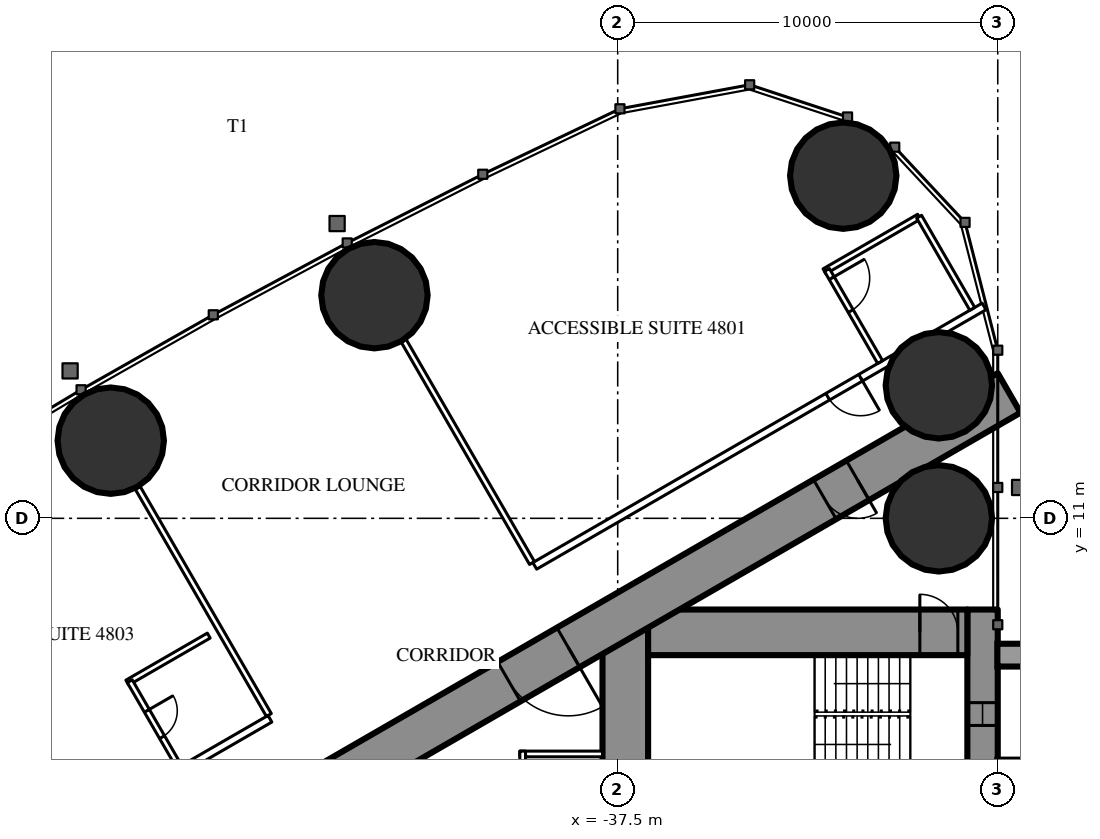
"""IFC4 building model, lengths in metres.
Left out: names, types, materials, properties, quantities, classifications, styles, units other than length and angle.
Written with IfcOpenShell. Run it as: python <this file> out.ifc"""

import sys

from ifc_helpers import new_model, si_unit, direction, frame, frame_2d, origin, origin_2d, place, context, subcontext, project, spatial, rectangle, circle, extrude, element, fill, save


model = new_model("IFC4")
c1 = context("Model", 3, precision=1e-05, world=origin(), true_north=direction((0.0, 1.0)))
c2 = subcontext(c1, "Body", "Model", "MODEL_VIEW")
j1 = project(units=[si_unit("LENGTHUNIT", "METRE"), si_unit("PLANEANGLEUNIT", "RADIAN")], contexts=[c1])
p1 = place(None, origin())
s1 = spatial("IfcSite", under=j1, at=p1, CompositionType="ELEMENT")
p2 = place(p1, origin())
s2 = spatial("IfcBuilding", under=s1, at=p2, CompositionType="ELEMENT")
p3 = place(p2, frame((0.0, 0.0, 180.8)))
s3 = spatial("IfcBuildingStorey", under=s2, at=p3, CompositionType="ELEMENT", Elevation=180.8)
for number, where, z_axis, x_axis in (
    (1, (-31.565, 20.016, 0.0), (0.0, 0.0, 1.0), (1.0, 0.0, 0.0)),
    (2, (-29.05, 11.0, 0.0), (0.0, 0.0, 1.0), (1.0, 0.0, 0.0)),
    (3, (-29.05, 14.5, 0.0), (0.0, 0.0, 1.0), (1.0, 0.0, 0.0)),
    (4, (-43.9, 16.871, 0.0), (0.0, 0.0, 1.0), (1.0, 0.0, 0.0)),
    (5, (-50.839, 13.043, 0.0), (0.0, 0.0, 1.0), (1.0, 0.0, 0.0)),
):
    element("IfcColumn", number, at=place(p3, frame(where, z_axis=z_axis, x_axis=x_axis)), inside=s3, PredefinedType="COLUMN", context=c2, shape_type="SweptSolid", body=[
        extrude(circle(Radius=1.4, at=origin_2d()), origin(), (0.0, 0.0, 1.0), 3.5),
    ])
p4 = place(p3, frame((-27.9, 8.6, 0.0), z_axis=(0.0, 0.0, 1.0), x_axis=(0.0, -1.0, 0.0)))
e6 = element("IfcWall", 6, at=p4, inside=s3, PredefinedType="SHEAR", context=c2, shape_type="SweptSolid", body=[
    extrude(rectangle(XDim=17.2, YDim=0.8, at=frame_2d((8.6, 0.0))), origin(), (0.0, 0.0, 1.0), 3.5),
])
p5 = place(p4, frame((2.45, 0.0, 0.6)))
e7 = element("IfcOpeningElement", 7, at=p5, cuts=e6, PredefinedType="OPENING", context=c2, shape_type="SweptSolid", body=[
    extrude(rectangle(XDim=0.6, YDim=2.1, at=frame_2d((0.3, 1.05))), frame((0.0, 0.41, 0.0), z_axis=(0.0, -1.0, 0.0), x_axis=(1.0, 0.0, 0.0)), (0.0, 0.0, 1.0), 0.82),
])
p6 = place(p4, frame((14.15, 0.0, 0.6)))
e8 = element("IfcOpeningElement", 8, at=p6, cuts=e6, PredefinedType="OPENING", context=c2, shape_type="SweptSolid", body=[
    extrude(rectangle(XDim=0.6, YDim=2.1, at=frame_2d((0.3, 1.05))), frame((0.0, 0.41, 0.0), z_axis=(0.0, -1.0, 0.0), x_axis=(1.0, 0.0, 0.0)), (0.0, 0.0, 1.0), 0.82),
])
p7 = place(p3, frame((-37.3, 8.6, 0.0), z_axis=(0.0, 0.0, 1.0), x_axis=(0.0, -1.0, 0.0)))
e9 = element("IfcWall", 9, at=p7, inside=s3, PredefinedType="SHEAR", context=c2, shape_type="SweptSolid", body=[
    extrude(rectangle(XDim=17.2, YDim=1.2, at=frame_2d((8.6, 0.0))), origin(), (0.0, 0.0, 1.0), 3.5),
])
p8 = place(p7, frame((7.7, 0.0, 0.0)))
e10 = element("IfcOpeningElement", 10, at=p8, cuts=e9, PredefinedType="OPENING", context=c2, shape_type="SweptSolid", body=[
    extrude(rectangle(XDim=1.8, YDim=2.2, at=frame_2d((0.9, 1.1))), frame((0.0, 0.61, 0.0), z_axis=(0.0, -1.0, 0.0), x_axis=(1.0, 0.0, 0.0)), (0.0, 0.0, 1.0), 1.22),
])
p9 = place(p3, frame((-28.3, 8.0, 0.0), z_axis=(0.0, 0.0, 1.0), x_axis=(-1.0, 0.0, 0.0)))
e11 = element("IfcWall", 11, at=p9, inside=s3, PredefinedType="SHEAR", context=c2, shape_type="SweptSolid", body=[
    extrude(rectangle(XDim=8.4, YDim=1.2, at=frame_2d((4.2, 0.0))), origin(), (0.0, 0.0, 1.0), 3.5),
])
p10 = place(p9, frame((0.25, 0.0, 0.0)))
e12 = element("IfcOpeningElement", 12, at=p10, cuts=e11, PredefinedType="OPENING", context=c2, shape_type="SweptSolid", body=[
    extrude(rectangle(XDim=1.0, YDim=2.2, at=frame_2d((0.5, 1.1))), frame((0.0, 0.61, 0.0), z_axis=(0.0, -1.0, 0.0), x_axis=(1.0, 0.0, 0.0)), (0.0, 0.0, 1.0), 1.22),
])
p11 = place(p3, frame((-27.2, 14.3, 0.0), z_axis=(0.0, 0.0, 1.0), x_axis=(-0.866026593062, -0.499997940104, 0.0)))
e13 = element("IfcWall", 13, at=p11, inside=s3, PredefinedType="SHEAR", context=c2, shape_type="SweptSolid", body=[
    extrude(rectangle(XDim=28.946, YDim=1.2, at=frame_2d((14.473, 0.0))), origin(), (0.0, 0.0, 1.0), 3.5),
])
p12 = place(p11, frame((4.6, 0.0, 0.0)))
e14 = element("IfcOpeningElement", 14, at=p12, cuts=e13, PredefinedType="OPENING", context=c2, shape_type="SweptSolid", body=[
    extrude(rectangle(XDim=1.0, YDim=2.2, at=frame_2d((0.5, 1.1))), frame((0.0, 0.61, 0.0), z_axis=(0.0, -1.0, 0.0), x_axis=(1.0, 0.0, 0.0)), (0.0, 0.0, 1.0), 1.22),
])
p13 = place(p11, frame((13.395, 0.0, 0.0)))
e15 = element("IfcOpeningElement", 15, at=p13, cuts=e13, PredefinedType="OPENING", context=c2, shape_type="SweptSolid", body=[
    extrude(rectangle(XDim=1.8, YDim=2.2, at=frame_2d((0.9, 1.1))), frame((0.0, 0.61, 0.0), z_axis=(0.0, -1.0, 0.0), x_axis=(1.0, 0.0, 0.0)), (0.0, 0.0, 1.0), 1.22),
])
p14 = place(p3, frame((-39.754, 9.823, 0.0), z_axis=(0.0, 0.0, 1.0), x_axis=(-0.499997670926, 0.866026748472, 0.0)))
e16 = element("IfcWall", 16, at=p14, inside=s3, PredefinedType="PARTITIONING", context=c2, shape_type="SweptSolid", body=[
    extrude(rectangle(XDim=6.757, YDim=0.15, at=frame_2d((3.379, 0.0))), origin(), (0.0, 0.0, 1.0), 2.3),
])
p15 = place(p3, frame((-46.679, 5.825, 0.0), z_axis=(0.0, 0.0, 1.0), x_axis=(-0.500006839597, 0.866021454905, 0.0)))
e17 = element("IfcWall", 17, at=p15, inside=s3, PredefinedType="PARTITIONING", context=c2, shape_type="SweptSolid", body=[
    extrude(rectangle(XDim=6.911, YDim=0.15, at=frame_2d((3.456, 0.0))), origin(), (0.0, 0.0, 1.0), 2.3),
])
p16 = place(p3, frame((-27.86, 16.575, 0.0), z_axis=(0.0, 0.0, 1.0), x_axis=(-0.866026850238, -0.499997494661, 0.0)))
e18 = element("IfcWall", 18, at=p16, inside=s3, PredefinedType="PARTITIONING", context=c2, shape_type="SweptSolid", body=[
    extrude(rectangle(XDim=13.651, YDim=0.2, at=frame_2d((6.826, 0.0))), origin(), (0.0, 0.0, 1.0), 3.25),
])
p17 = place(p16, frame((3.75, 0.0, 0.0)))
e19 = element("IfcOpeningElement", 19, at=p17, cuts=e18, PredefinedType="OPENING", context=c2, shape_type="SweptSolid", body=[
    extrude(rectangle(XDim=1.0, YDim=2.2, at=frame_2d((0.5, 1.1))), frame((0.0, 0.11, 0.0), z_axis=(0.0, -1.0, 0.0), x_axis=(1.0, 0.0, 0.0)), (0.0, 0.0, 1.0), 0.22),
])
p18 = place(p3, frame((-46.65, 5.726, 0.0), z_axis=(0.0, 0.0, 1.0), x_axis=(-0.866027963864, -0.499995565786, 0.0)))
e20 = element("IfcWall", 20, at=p18, inside=s3, PredefinedType="PARTITIONING", context=c2, shape_type="SweptSolid", body=[
    extrude(rectangle(XDim=11.452, YDim=0.2, at=frame_2d((5.726, 0.0))), origin(), (0.0, 0.0, 1.0), 3.25),
])
p19 = place(p18, frame((2.95, 0.0, 0.0)))
e21 = element("IfcOpeningElement", 21, at=p19, cuts=e20, PredefinedType="OPENING", context=c2, shape_type="SweptSolid", body=[
    extrude(rectangle(XDim=0.95, YDim=2.2, at=frame_2d((0.475, 1.1))), frame((0.0, 0.11, 0.0), z_axis=(0.0, -1.0, 0.0), x_axis=(1.0, 0.0, 0.0)), (0.0, 0.0, 1.0), 0.22),
])
p20 = place(p18, frame((8.344, 0.0, 0.0)))
e22 = element("IfcOpeningElement", 22, at=p20, cuts=e20, PredefinedType="OPENING", context=c2, shape_type="SweptSolid", body=[
    extrude(rectangle(XDim=0.95, YDim=2.2, at=frame_2d((0.475, 1.1))), frame((0.0, 0.11, 0.0), z_axis=(0.0, -1.0, 0.0), x_axis=(1.0, 0.0, 0.0)), (0.0, 0.0, 1.0), 0.22),
])
p21 = place(p3, frame((-29.57, 18.936, 0.0), z_axis=(0.0, 0.0, 1.0), x_axis=(-0.866018712932, -0.500011588718, 0.0)))
e23 = element("IfcWall", 23, at=p21, inside=s3, PredefinedType="PARTITIONING", context=c2, shape_type="SweptSolid", body=[
    extrude(rectangle(XDim=2.875, YDim=0.15, at=frame_2d((1.438, 0.0))), origin(), (0.0, 0.0, 1.0), 3.25),
])
p22 = place(p3, frame((-30.595, 15.111, 0.0), z_axis=(0.0, 0.0, 1.0), x_axis=(-0.49998411664, 0.866034573852, 0.0)))
e24 = element("IfcWall", 24, at=p22, inside=s3, PredefinedType="PARTITIONING", context=c2, shape_type="SweptSolid", body=[
    extrude(rectangle(XDim=2.8, YDim=0.15, at=frame_2d((1.4, 0.0))), origin(), (0.0, 0.0, 1.0), 3.25),
])
p23 = place(p22, frame((1.55, 0.0, 0.0)))
e25 = element("IfcOpeningElement", 25, at=p23, cuts=e24, PredefinedType="OPENING", context=c2, shape_type="SweptSolid", body=[
    extrude(rectangle(XDim=1.0, YDim=2.2, at=frame_2d((0.5, 1.1))), frame((0.0, 0.085, 0.0), z_axis=(0.0, -1.0, 0.0), x_axis=(1.0, 0.0, 0.0)), (0.0, 0.0, 1.0), 0.17),
])
p24 = place(p3, frame((-28.17, 16.511, 0.0), z_axis=(0.0, 0.0, 1.0), x_axis=(-0.49994636267, 0.866056369097, 0.0)))
e26 = element("IfcWall", 26, at=p24, inside=s3, PredefinedType="PARTITIONING", context=c2, shape_type="SweptSolid", body=[
    extrude(rectangle(XDim=2.8, YDim=0.15, at=frame_2d((1.4, 0.0))), origin(), (0.0, 0.0, 1.0), 3.25),
])
p25 = place(p3, frame((-48.26, 7.914, 0.0), z_axis=(0.0, 0.0, 1.0), x_axis=(-0.866031185235, -0.4999899861, 0.0)))
e27 = element("IfcWall", 27, at=p25, inside=s3, PredefinedType="PARTITIONING", context=c2, shape_type="SweptSolid", body=[
    extrude(rectangle(XDim=2.475, YDim=0.15, at=frame_2d((1.238, 0.0))), origin(), (0.0, 0.0, 1.0), 3.25),
])
p26 = place(p3, frame((-49.039, 4.463, 0.0), z_axis=(0.0, 0.0, 1.0), x_axis=(-0.499936506574, 0.866062058628, 0.0)))
e28 = element("IfcWall", 28, at=p26, inside=s3, PredefinedType="PARTITIONING", context=c2, shape_type="SweptSolid", body=[
    extrude(rectangle(XDim=2.6, YDim=0.15, at=frame_2d((1.3, 0.0))), origin(), (0.0, 0.0, 1.0), 3.25),
])
p27 = place(p26, frame((0.9, 0.0, 0.0)))
e29 = element("IfcOpeningElement", 29, at=p27, cuts=e28, PredefinedType="OPENING", context=c2, shape_type="SweptSolid", body=[
    extrude(rectangle(XDim=0.8, YDim=2.2, at=frame_2d((0.4, 1.1))), frame((0.0, 0.085, 0.0), z_axis=(0.0, -1.0, 0.0), x_axis=(1.0, 0.0, 0.0)), (0.0, 0.0, 1.0), 0.17),
])
p28 = place(p3, frame((-37.9, 4.8, 0.0), z_axis=(0.0, 0.0, 1.0), x_axis=(-1.0, 0.0, 0.0)))
e30 = element("IfcWall", 30, at=p28, inside=s3, PredefinedType="PARTITIONING", context=c2, shape_type="SweptSolid", body=[
    extrude(rectangle(XDim=2.175, YDim=0.15, at=frame_2d((1.087, 0.0))), origin(), (0.0, 0.0, 1.0), 3.25),
])
p29 = place(p3, frame((-40.0, 4.875, 0.0), z_axis=(0.0, 0.0, 1.0), x_axis=(0.0, -1.0, 0.0)))
e31 = element("IfcWall", 31, at=p29, inside=s3, PredefinedType="PARTITIONING", context=c2, shape_type="SweptSolid", body=[
    extrude(rectangle(XDim=3.75, YDim=0.15, at=frame_2d((1.875, 0.0))), origin(), (0.0, 0.0, 1.0), 3.25),
])
p30 = place(p29, frame((1.375, 0.0, 0.0)))
e32 = element("IfcOpeningElement", 32, at=p30, cuts=e31, PredefinedType="OPENING", context=c2, shape_type="SweptSolid", body=[
    extrude(rectangle(XDim=1.0, YDim=2.2, at=frame_2d((0.5, 1.1))), frame((0.0, 0.085, 0.0), z_axis=(0.0, -1.0, 0.0), x_axis=(1.0, 0.0, 0.0)), (0.0, 0.0, 1.0), 0.17),
])
p31 = place(p23, origin())
e33 = element("IfcDoor", 33, at=p31, inside=s3, OperationType="SINGLE_SWING_RIGHT", PredefinedType="DOOR", context=c2, shape_type="SweptSolid", body=[
    extrude(rectangle(XDim=1.0, YDim=2.2, at=frame_2d((0.5, 1.1))), frame((0.0, 0.025, 0.0), z_axis=(0.0, -1.0, 0.0), x_axis=(1.0, 0.0, 0.0)), (0.0, 0.0, 1.0), 0.05),
])
fill(e25, e33)
p32 = place(p17, origin())
e34 = element("IfcDoor", 34, at=p32, inside=s3, OperationType="SINGLE_SWING_LEFT", PredefinedType="DOOR", context=c2, shape_type="SweptSolid", body=[
    extrude(rectangle(XDim=1.0, YDim=2.2, at=frame_2d((0.5, 1.1))), frame((0.0, 0.025, 0.0), z_axis=(0.0, -1.0, 0.0), x_axis=(1.0, 0.0, 0.0)), (0.0, 0.0, 1.0), 0.05),
])
fill(e19, e34)
p33 = place(p27, origin())
e35 = element("IfcDoor", 35, at=p33, inside=s3, OperationType="SINGLE_SWING_RIGHT", PredefinedType="DOOR", context=c2, shape_type="SweptSolid", body=[
    extrude(rectangle(XDim=0.8, YDim=2.2, at=frame_2d((0.4, 1.1))), frame((0.0, 0.025, 0.0), z_axis=(0.0, -1.0, 0.0), x_axis=(1.0, 0.0, 0.0)), (0.0, 0.0, 1.0), 0.05),
])
fill(e29, e35)
p34 = place(p12, origin())
e36 = element("IfcDoor", 36, at=p34, inside=s3, OperationType="SINGLE_SWING_LEFT", PredefinedType="DOOR", context=c2, shape_type="SweptSolid", body=[
    extrude(rectangle(XDim=1.0, YDim=2.2, at=frame_2d((0.5, 1.1))), frame((0.0, 0.025, 0.0), z_axis=(0.0, -1.0, 0.0), x_axis=(1.0, 0.0, 0.0)), (0.0, 0.0, 1.0), 0.05),
])
fill(e14, e36)
p35 = place(p13, origin())
e37 = element("IfcDoor", 37, at=p35, inside=s3, OperationType="DOUBLE_DOOR_SINGLE_SWING", PredefinedType="DOOR", context=c2, shape_type="SweptSolid", body=[
    extrude(rectangle(XDim=1.8, YDim=2.2, at=frame_2d((0.9, 1.1))), frame((0.0, 0.025, 0.0), z_axis=(0.0, -1.0, 0.0), x_axis=(1.0, 0.0, 0.0)), (0.0, 0.0, 1.0), 0.05),
])
fill(e15, e37)
p36 = place(p10, origin())
e38 = element("IfcDoor", 38, at=p36, inside=s3, OperationType="SINGLE_SWING_RIGHT", PredefinedType="DOOR", context=c2, shape_type="SweptSolid", body=[
    extrude(rectangle(XDim=1.0, YDim=2.2, at=frame_2d((0.5, 1.1))), frame((0.0, 0.025, 0.0), z_axis=(0.0, -1.0, 0.0), x_axis=(1.0, 0.0, 0.0)), (0.0, 0.0, 1.0), 0.05),
])
fill(e12, e38)
p37 = place(p5, origin())
e39 = element("IfcWindow", 39, at=p37, inside=s3, PartitioningType="SINGLE_PANEL", PredefinedType="WINDOW", context=c2, shape_type="SweptSolid", body=[
    extrude(rectangle(XDim=0.6, YDim=2.1, at=frame_2d((0.3, 1.05))), frame((0.0, 0.03, 0.0), z_axis=(0.0, -1.0, 0.0), x_axis=(1.0, 0.0, 0.0)), (0.0, 0.0, 1.0), 0.06),
])
fill(e7, e39)
save(model, sys.argv[1])
